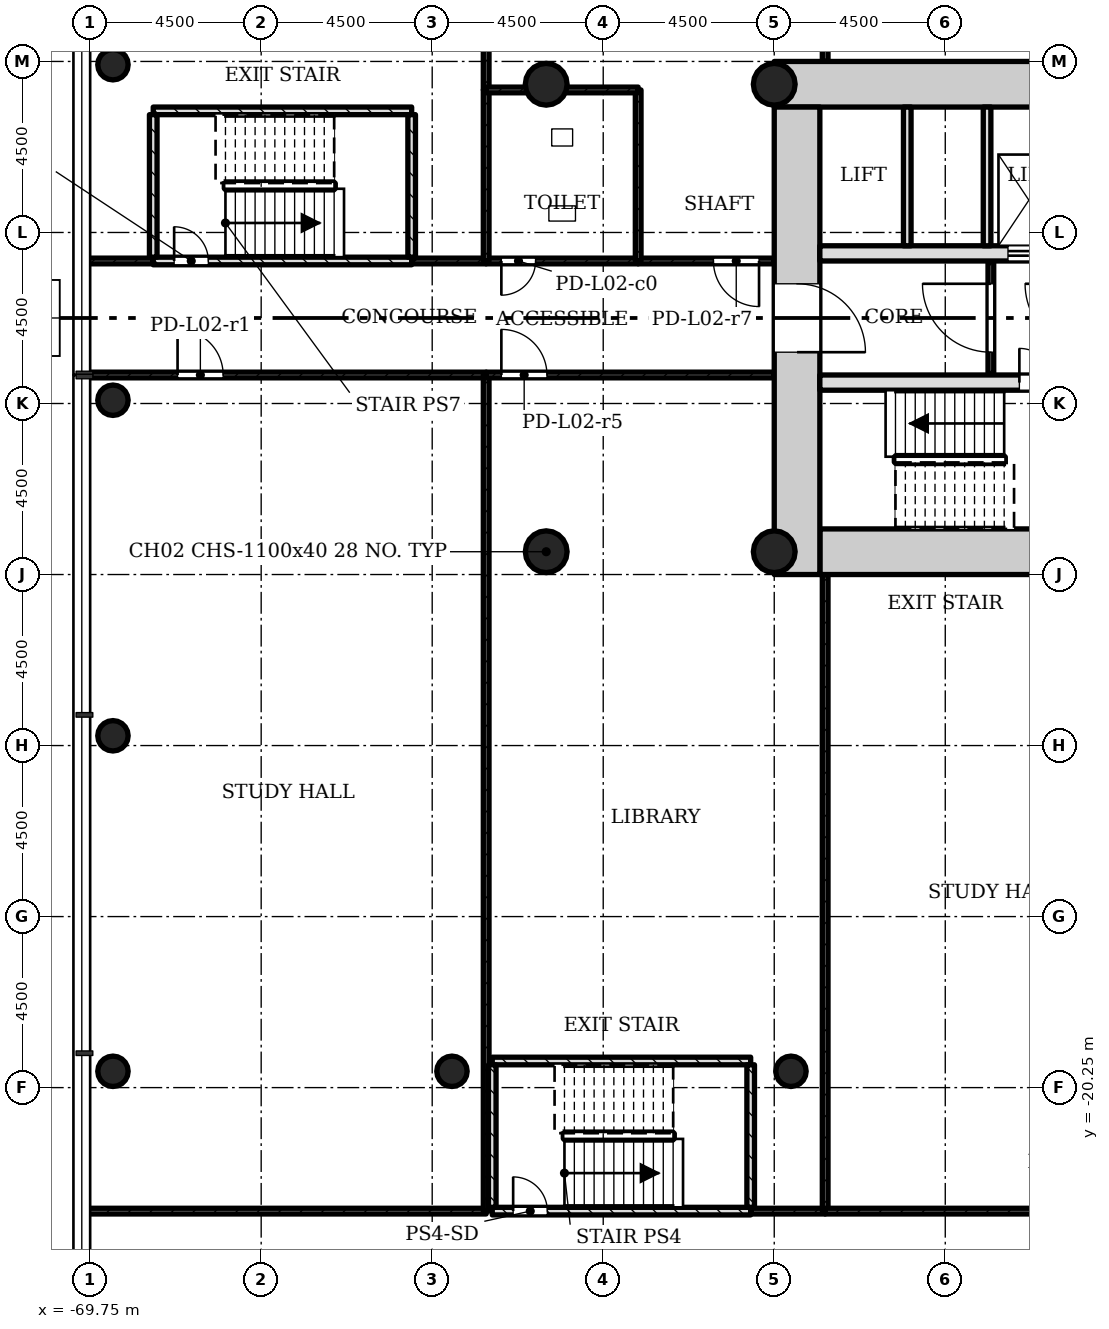
"""IFC4 building model, lengths in metres.
Left out: names, types, materials, properties, quantities, classifications, styles, units other than length and angle.
Written with IfcOpenShell. Run it as: python <this file> out.ifc"""

import sys

from ifc_helpers import new_model, si_unit, direction, frame, frame_2d, origin, origin_2d, place, context, subcontext, project, spatial, rectangle, hollow_circle, extrude, element, fill, save


model = new_model("IFC4")
c1 = context("Model", 3, precision=1e-05, world=origin(), true_north=direction((0.0, 1.0)))
c2 = subcontext(c1, "Body", "Model", "MODEL_VIEW")
j1 = project(units=[si_unit("LENGTHUNIT", "METRE"), si_unit("PLANEANGLEUNIT", "RADIAN")], contexts=[c1])
p1 = place(None, origin())
s1 = spatial("IfcSite", under=j1, at=p1, CompositionType="ELEMENT")
p2 = place(p1, origin())
s2 = spatial("IfcBuilding", under=s1, at=p2, CompositionType="ELEMENT")
p3 = place(p2, frame((0.0, 0.0, 11.0)))
s3 = spatial("IfcBuildingStorey", under=s2, at=p3, CompositionType="ELEMENT", Elevation=11.0)
for number, where, z_axis, x_axis in (
    (1, (-50.55, -6.15, 0.0), (0.0, 0.0, 1.0), (1.0, 0.0, 0.0)),
    (2, (-43.95, 6.15, 0.0), (0.0, 0.0, 1.0), (-1.0, 0.0, 0.0)),
):
    element("IfcWall", number, at=place(p3, frame(where, z_axis=z_axis, x_axis=x_axis)), inside=s3, PredefinedType="SHEAR", context=c2, shape_type="SweptSolid", body=[
        extrude(rectangle(XDim=7.8, YDim=1.2, at=frame_2d((3.9, 0.0))), origin(), (0.0, 0.0, 1.0), 4.5),
    ])
p4 = place(p3, frame((-51.15, 5.55, 0.0), z_axis=(0.0, 0.0, 1.0), x_axis=(0.0, -1.0, 0.0)))
e3 = element("IfcWall", 3, at=p4, inside=s3, PredefinedType="SHEAR", context=c2, shape_type="SweptSolid", body=[
    extrude(rectangle(XDim=12.3, YDim=1.2, at=frame_2d((6.15, 0.0))), origin(), (0.0, 0.0, 1.0), 4.5),
])
p5 = place(p4, frame((4.65, 0.0, 0.0)))
e4 = element("IfcOpeningElement", 4, at=p5, cuts=e3, PredefinedType="OPENING", context=c2, shape_type="SweptSolid", body=[
    extrude(rectangle(XDim=1.8, YDim=2.1, at=frame_2d((0.9, 1.05))), frame((0.0, 0.61, 0.0), z_axis=(0.0, -1.0, 0.0), x_axis=(1.0, 0.0, 0.0)), (0.0, 0.0, 1.0), 1.22),
])
p6 = place(p3, frame((-50.55, -1.7, 0.0), z_axis=(0.0, 0.0, 1.0), x_axis=(1.0, 0.0, 0.0)))
e5 = element("IfcWall", 5, at=p6, inside=s3, PredefinedType="SHEAR", context=c2, shape_type="SweptSolid", body=[
    extrude(rectangle(XDim=6.6, YDim=0.4, at=frame_2d((3.3, 0.0))), origin(), (0.0, 0.0, 1.0), 4.5),
])
p7 = place(p6, frame((5.25, 0.0, 0.0)))
e6 = element("IfcOpeningElement", 6, at=p7, cuts=e5, PredefinedType="OPENING", context=c2, shape_type="SweptSolid", body=[
    extrude(rectangle(XDim=0.9, YDim=2.1, at=frame_2d((0.45, 1.05))), frame((0.0, 0.21, 0.0), z_axis=(0.0, -1.0, 0.0), x_axis=(1.0, 0.0, 0.0)), (0.0, 0.0, 1.0), 0.42),
])
p8 = place(p3, frame((-50.55, 1.7, 0.0), z_axis=(0.0, 0.0, 1.0), x_axis=(1.0, 0.0, 0.0)))
e7 = element("IfcWall", 7, at=p8, inside=s3, PredefinedType="SHEAR", context=c2, shape_type="SweptSolid", body=[
    extrude(rectangle(XDim=6.6, YDim=0.4, at=frame_2d((3.3, 0.0))), origin(), (0.0, 0.0, 1.0), 4.5),
])
p9 = place(p8, frame((4.95, 0.0, 0.0)))
e8 = element("IfcOpeningElement", 8, at=p9, cuts=e7, PredefinedType="OPENING", context=c2, shape_type="SweptSolid", body=[
    extrude(rectangle(XDim=1.1, YDim=2.1, at=frame_2d((0.55, 1.05))), frame((0.0, 0.21, 0.0), z_axis=(0.0, -1.0, 0.0), x_axis=(1.0, 0.0, 0.0)), (0.0, 0.0, 1.0), 0.42),
])
for number, where, z_axis, x_axis in (
    (9, (-51.75, -6.15, 0.0), (0.0, 0.0, 1.0), (1.0, 0.0, 0.0)),
    (10, (-51.75, 6.15, 0.0), (0.0, 0.0, 1.0), (1.0, 0.0, 0.0)),
    (11, (-57.75, -6.15, 0.0), (0.0, 0.0, 1.0), (1.0, 0.0, 0.0)),
    (12, (-57.75, 6.15, 0.0), (0.0, 0.0, 1.0), (1.0, 0.0, 0.0)),
):
    element("IfcColumn", number, at=place(p3, frame(where, z_axis=z_axis, x_axis=x_axis)), inside=s3, PredefinedType="COLUMN", context=c2, shape_type="SweptSolid", body=[
        extrude(hollow_circle(Radius=0.55, WallThickness=0.04, at=origin_2d()), origin(), (0.0, 0.0, 1.0), 4.5),
    ])
for number, where, z_axis, x_axis in (
    (13, (-69.15, -19.821, 0.0), (0.0, 0.0, 1.0), (1.0, 0.0, 0.0)),
    (14, (-60.23, -19.821, 0.0), (0.0, 0.0, 1.0), (1.0, 0.0, 0.0)),
    (15, (-51.31, -19.821, 0.0), (0.0, 0.0, 1.0), (1.0, 0.0, 0.0)),
    (16, (-69.15, -10.993, 0.0), (0.0, 0.0, 1.0), (1.0, 0.0, 0.0)),
    (17, (-69.15, -2.164, 0.0), (0.0, 0.0, 1.0), (1.0, 0.0, 0.0)),
    (18, (-69.15, 6.664, 0.0), (0.0, 0.0, 1.0), (1.0, 0.0, 0.0)),
):
    element("IfcColumn", number, at=place(p3, frame(where, z_axis=z_axis, x_axis=x_axis)), inside=s3, PredefinedType="COLUMN", context=c2, shape_type="SweptSolid", body=[
        extrude(hollow_circle(Radius=0.4, WallThickness=0.028, at=origin_2d()), origin(), (0.0, 0.0, 1.0), 4.5),
    ])
p10 = place(p3, frame((-46.05, 1.5, 0.0), z_axis=(0.0, 0.0, 1.0), x_axis=(0.0, -1.0, 0.0)))
e19 = element("IfcWall", 19, at=p10, inside=s3, PredefinedType="PARTITIONING", context=c2, shape_type="SweptSolid", body=[
    extrude(rectangle(XDim=3.0, YDim=0.15, at=frame_2d((1.5, 0.0))), origin(), (0.0, 0.0, 1.0), 4.08),
])
p11 = place(p10, frame((0.6, 0.0, 0.0)))
e20 = element("IfcOpeningElement", 20, at=p11, cuts=e19, PredefinedType="OPENING", context=c2, shape_type="SweptSolid", body=[
    extrude(rectangle(XDim=1.8, YDim=2.1, at=frame_2d((0.9, 1.05))), frame((0.0, 0.085, 0.0), z_axis=(0.0, -1.0, 0.0), x_axis=(1.0, 0.0, 0.0)), (0.0, 0.0, 1.0), 0.17),
])
for number, where, z_axis, x_axis in (
    (21, (-46.15, 5.55, 0.0), (0.0, 0.0, 1.0), (0.0, -1.0, 0.0)),
    (22, (-48.25, 5.55, 0.0), (0.0, 0.0, 1.0), (0.0, -1.0, 0.0)),
):
    element("IfcWall", number, at=place(p3, frame(where, z_axis=z_axis, x_axis=x_axis)), inside=s3, PredefinedType="SOLIDWALL", context=c2, shape_type="SweptSolid", body=[
        extrude(rectangle(XDim=3.65, YDim=0.2, at=frame_2d((1.825, 0.0))), origin(), (0.0, 0.0, 1.0), 4.08),
    ])
p12 = place(p3, frame((-69.85, -1.5, 0.0), z_axis=(0.0, 0.0, 1.0), x_axis=(1.0, 0.0, 0.0)))
e23 = element("IfcWall", 23, at=p12, inside=s3, PredefinedType="PARTITIONING", context=c2, shape_type="SweptSolid", body=[
    extrude(rectangle(XDim=10.52, YDim=0.15, at=frame_2d((5.26, 0.0))), origin(), (0.0, 0.0, 1.0), 4.08),
])
p13 = place(p12, frame((2.4, 0.0, 0.0)))
e24 = element("IfcOpeningElement", 24, at=p13, cuts=e23, PredefinedType="OPENING", context=c2, shape_type="SweptSolid", body=[
    extrude(rectangle(XDim=1.2, YDim=2.1, at=frame_2d((0.6, 1.05))), frame((0.0, 0.085, 0.0), z_axis=(0.0, -1.0, 0.0), x_axis=(1.0, 0.0, 0.0)), (0.0, 0.0, 1.0), 0.17),
])
p14 = place(p3, frame((-59.33, -23.5, 0.0), z_axis=(0.0, 0.0, 1.0), x_axis=(-1.0, 0.0, 0.0)))
e25 = element("IfcWall", 25, at=p14, inside=s3, PredefinedType="PARTITIONING", context=c2, shape_type="SweptSolid", body=[
    extrude(rectangle(XDim=10.52, YDim=0.15, at=frame_2d((5.26, 0.0))), origin(), (0.0, 0.0, 1.0), 4.08),
])
p15 = place(p3, frame((-59.33, -1.5, 0.0), z_axis=(0.0, 0.0, 1.0), x_axis=(0.0, -1.0, 0.0)))
e26 = element("IfcWall", 26, at=p15, inside=s3, PredefinedType="PARTITIONING", context=c2, shape_type="SweptSolid", body=[
    extrude(rectangle(XDim=22.0, YDim=0.15, at=frame_2d((11.0, 0.0))), origin(), (0.0, 0.0, 1.0), 4.08),
])
p16 = place(p3, frame((-59.33, 1.5, 0.0), z_axis=(0.0, 0.0, 1.0), x_axis=(-1.0, 0.0, 0.0)))
e27 = element("IfcWall", 27, at=p16, inside=s3, PredefinedType="PARTITIONING", context=c2, shape_type="SweptSolid", body=[
    extrude(rectangle(XDim=1.96, YDim=0.15, at=frame_2d((0.98, 0.0))), origin(), (0.0, 0.0, 1.0), 4.08),
])
p17 = place(p3, frame((-68.09, 1.5, 0.0), z_axis=(0.0, 0.0, 1.0), x_axis=(-1.0, 0.0, 0.0)))
e28 = element("IfcWall", 28, at=p17, inside=s3, PredefinedType="PARTITIONING", context=c2, shape_type="SweptSolid", body=[
    extrude(rectangle(XDim=1.76, YDim=0.15, at=frame_2d((0.88, 0.0))), origin(), (0.0, 0.0, 1.0), 4.08),
])
p18 = place(p3, frame((-59.33, 26.5, 0.0), z_axis=(0.0, 0.0, 1.0), x_axis=(0.0, -1.0, 0.0)))
e29 = element("IfcWall", 29, at=p18, inside=s3, PredefinedType="PARTITIONING", context=c2, shape_type="SweptSolid", body=[
    extrude(rectangle(XDim=20.5, YDim=0.15, at=frame_2d((10.25, 0.0))), origin(), (0.0, 0.0, 1.0), 4.08),
])
p19 = place(p3, frame((-59.33, -1.5, 0.0), z_axis=(0.0, 0.0, 1.0), x_axis=(1.0, 0.0, 0.0)))
e30 = element("IfcWall", 30, at=p19, inside=s3, PredefinedType="PARTITIONING", context=c2, shape_type="SweptSolid", body=[
    extrude(rectangle(XDim=7.58, YDim=0.15, at=frame_2d((3.79, 0.0))), origin(), (0.0, 0.0, 1.0), 4.08),
])
p20 = place(p19, frame((0.4, 0.0, 0.0)))
e31 = element("IfcOpeningElement", 31, at=p20, cuts=e30, PredefinedType="OPENING", context=c2, shape_type="SweptSolid", body=[
    extrude(rectangle(XDim=1.2, YDim=2.1, at=frame_2d((0.6, 1.05))), frame((0.0, 0.085, 0.0), z_axis=(0.0, -1.0, 0.0), x_axis=(1.0, 0.0, 0.0)), (0.0, 0.0, 1.0), 0.17),
])
p21 = place(p3, frame((-50.41, -23.5, 0.0), z_axis=(0.0, 0.0, 1.0), x_axis=(-1.0, 0.0, 0.0)))
e32 = element("IfcWall", 32, at=p21, inside=s3, PredefinedType="PARTITIONING", context=c2, shape_type="SweptSolid", body=[
    extrude(rectangle(XDim=1.96, YDim=0.15, at=frame_2d((0.98, 0.0))), origin(), (0.0, 0.0, 1.0), 4.08),
])
p22 = place(p3, frame((-50.41, -6.75, 0.0), z_axis=(0.0, 0.0, 1.0), x_axis=(0.0, -1.0, 0.0)))
e33 = element("IfcWall", 33, at=p22, inside=s3, PredefinedType="PARTITIONING", context=c2, shape_type="SweptSolid", body=[
    extrude(rectangle(XDim=16.75, YDim=0.15, at=frame_2d((8.375, 0.0))), origin(), (0.0, 0.0, 1.0), 4.08),
])
p23 = place(p3, frame((-51.75, 1.5, 0.0), z_axis=(0.0, 0.0, 1.0), x_axis=(-1.0, 0.0, 0.0)))
e34 = element("IfcWall", 34, at=p23, inside=s3, PredefinedType="PARTITIONING", context=c2, shape_type="SweptSolid", body=[
    extrude(rectangle(XDim=3.58, YDim=0.15, at=frame_2d((1.79, 0.0))), origin(), (0.0, 0.0, 1.0), 4.08),
])
p24 = place(p23, frame((0.4, 0.0, 0.0)))
e35 = element("IfcOpeningElement", 35, at=p24, cuts=e34, PredefinedType="OPENING", context=c2, shape_type="SweptSolid", body=[
    extrude(rectangle(XDim=1.2, YDim=2.1, at=frame_2d((0.6, 1.05))), frame((0.0, 0.085, 0.0), z_axis=(0.0, -1.0, 0.0), x_axis=(1.0, 0.0, 0.0)), (0.0, 0.0, 1.0), 0.17),
])
p25 = place(p3, frame((-41.49, -23.5, 0.0), z_axis=(0.0, 0.0, 1.0), x_axis=(-1.0, 0.0, 0.0)))
e36 = element("IfcWall", 36, at=p25, inside=s3, PredefinedType="PARTITIONING", context=c2, shape_type="SweptSolid", body=[
    extrude(rectangle(XDim=8.92, YDim=0.15, at=frame_2d((4.46, 0.0))), origin(), (0.0, 0.0, 1.0), 4.08),
])
p26 = place(p25, frame((0.4, 0.0, 0.0)))
e37 = element("IfcOpeningElement", 37, at=p26, cuts=e36, PredefinedType="OPENING", context=c2, shape_type="SweptSolid", body=[
    extrude(rectangle(XDim=1.2, YDim=2.1, at=frame_2d((0.6, 1.05))), frame((0.0, 0.085, 0.0), z_axis=(0.0, -1.0, 0.0), x_axis=(1.0, 0.0, 0.0)), (0.0, 0.0, 1.0), 0.17),
])
p27 = place(p3, frame((-50.41, 6.75, 0.0), z_axis=(0.0, 0.0, 1.0), x_axis=(0.0, 1.0, 0.0)))
e38 = element("IfcWall", 38, at=p27, inside=s3, PredefinedType="PARTITIONING", context=c2, shape_type="SweptSolid", body=[
    extrude(rectangle(XDim=19.75, YDim=0.15, at=frame_2d((9.875, 0.0))), origin(), (0.0, 0.0, 1.0), 4.08),
])
p28 = place(p3, frame((-59.33, 1.5, 0.0), z_axis=(0.0, 0.0, 1.0), x_axis=(1.0, 0.0, 0.0)))
e39 = element("IfcWall", 39, at=p28, inside=s3, PredefinedType="PARTITIONING", context=c2, shape_type="SweptSolid", body=[
    extrude(rectangle(XDim=4.0, YDim=0.15, at=frame_2d((2.0, 0.0))), origin(), (0.0, 0.0, 1.0), 4.08),
])
p29 = place(p28, frame((0.4, 0.0, 0.0)))
e40 = element("IfcOpeningElement", 40, at=p29, cuts=e39, PredefinedType="OPENING", context=c2, shape_type="SweptSolid", body=[
    extrude(rectangle(XDim=0.9, YDim=2.1, at=frame_2d((0.45, 1.05))), frame((0.0, 0.085, 0.0), z_axis=(0.0, -1.0, 0.0), x_axis=(1.0, 0.0, 0.0)), (0.0, 0.0, 1.0), 0.17),
])
for number, where, z_axis, x_axis in (
    (41, (-59.33, 6.0, 0.0), (0.0, 0.0, 1.0), (0.0, -1.0, 0.0)),
    (42, (-55.33, 1.5, 0.0), (0.0, 0.0, 1.0), (0.0, 1.0, 0.0)),
):
    element("IfcWall", number, at=place(p3, frame(where, z_axis=z_axis, x_axis=x_axis)), inside=s3, PredefinedType="PARTITIONING", context=c2, shape_type="SweptSolid", body=[
        extrude(rectangle(XDim=4.5, YDim=0.15, at=frame_2d((2.25, 0.0))), origin(), (0.0, 0.0, 1.0), 4.08),
    ])
p30 = place(p3, frame((-55.33, 6.0, 0.0), z_axis=(0.0, 0.0, 1.0), x_axis=(-1.0, 0.0, 0.0)))
e43 = element("IfcWall", 43, at=p30, inside=s3, PredefinedType="PARTITIONING", context=c2, shape_type="SweptSolid", body=[
    extrude(rectangle(XDim=4.0, YDim=0.15, at=frame_2d((2.0, 0.0))), origin(), (0.0, 0.0, 1.0), 4.08),
])
p31 = place(p3, frame((-59.17, -23.5, 0.0), z_axis=(0.0, 0.0, 1.0), x_axis=(1.0, 0.0, 0.0)))
e44 = element("IfcWall", 44, at=p31, inside=s3, PredefinedType="SHEAR", context=c2, shape_type="SweptSolid", body=[
    extrude(rectangle(XDim=6.8, YDim=0.2, at=frame_2d((3.4, 0.0))), origin(), (0.0, 0.0, 1.0), 4.08),
])
p32 = place(p31, frame((0.55, 0.0, 0.0)))
e45 = element("IfcOpeningElement", 45, at=p32, cuts=e44, PredefinedType="OPENING", context=c2, shape_type="SweptSolid", body=[
    extrude(rectangle(XDim=0.9, YDim=2.1, at=frame_2d((0.45, 1.05))), frame((0.0, 0.11, 0.0), z_axis=(0.0, -1.0, 0.0), x_axis=(1.0, 0.0, 0.0)), (0.0, 0.0, 1.0), 0.22),
])
p33 = place(p3, frame((-59.17, -19.55, 0.0), z_axis=(0.0, 0.0, 1.0), x_axis=(1.0, 0.0, 0.0)))
e46 = element("IfcWall", 46, at=p33, inside=s3, PredefinedType="SHEAR", context=c2, shape_type="SweptSolid", body=[
    extrude(rectangle(XDim=6.8, YDim=0.2, at=frame_2d((3.4, 0.0))), origin(), (0.0, 0.0, 1.0), 4.08),
])
for number, where, z_axis, x_axis in (
    (47, (-59.17, -23.4, 0.0), (0.0, 0.0, 1.0), (0.0, 1.0, 0.0)),
    (48, (-52.37, -23.4, 0.0), (0.0, 0.0, 1.0), (0.0, 1.0, 0.0)),
):
    element("IfcWall", number, at=place(p3, frame(where, z_axis=z_axis, x_axis=x_axis)), inside=s3, PredefinedType="SHEAR", context=c2, shape_type="SweptSolid", body=[
        extrude(rectangle(XDim=3.75, YDim=0.2, at=frame_2d((1.875, 0.0))), origin(), (0.0, 0.0, 1.0), 4.08),
    ])
p34 = place(p3, frame((-68.09, 1.5, 0.0), z_axis=(0.0, 0.0, 1.0), x_axis=(1.0, 0.0, 0.0)))
e49 = element("IfcWall", 49, at=p34, inside=s3, PredefinedType="SHEAR", context=c2, shape_type="SweptSolid", body=[
    extrude(rectangle(XDim=6.8, YDim=0.2, at=frame_2d((3.4, 0.0))), origin(), (0.0, 0.0, 1.0), 4.08),
])
p35 = place(p34, frame((0.55, 0.0, 0.0)))
e50 = element("IfcOpeningElement", 50, at=p35, cuts=e49, PredefinedType="OPENING", context=c2, shape_type="SweptSolid", body=[
    extrude(rectangle(XDim=0.9, YDim=2.1, at=frame_2d((0.45, 1.05))), frame((0.0, 0.11, 0.0), z_axis=(0.0, -1.0, 0.0), x_axis=(1.0, 0.0, 0.0)), (0.0, 0.0, 1.0), 0.22),
])
p36 = place(p3, frame((-68.09, 5.45, 0.0), z_axis=(0.0, 0.0, 1.0), x_axis=(1.0, 0.0, 0.0)))
e51 = element("IfcWall", 51, at=p36, inside=s3, PredefinedType="SHEAR", context=c2, shape_type="SweptSolid", body=[
    extrude(rectangle(XDim=6.8, YDim=0.2, at=frame_2d((3.4, 0.0))), origin(), (0.0, 0.0, 1.0), 4.08),
])
for number, where, z_axis, x_axis in (
    (52, (-68.09, 1.6, 0.0), (0.0, 0.0, 1.0), (0.0, 1.0, 0.0)),
    (53, (-61.29, 1.6, 0.0), (0.0, 0.0, 1.0), (0.0, 1.0, 0.0)),
):
    element("IfcWall", number, at=place(p3, frame(where, z_axis=z_axis, x_axis=x_axis)), inside=s3, PredefinedType="SHEAR", context=c2, shape_type="SweptSolid", body=[
        extrude(rectangle(XDim=3.75, YDim=0.2, at=frame_2d((1.875, 0.0))), origin(), (0.0, 0.0, 1.0), 4.08),
    ])
p37 = place(p11, origin())
e54 = element("IfcDoor", 54, at=p37, inside=s3, OperationType="SINGLE_SWING_LEFT", PredefinedType="DOOR", context=c2, shape_type="SweptSolid", body=[
    extrude(rectangle(XDim=1.8, YDim=2.1, at=frame_2d((0.9, 1.05))), frame((0.0, 0.025, 0.0), z_axis=(0.0, -1.0, 0.0), x_axis=(1.0, 0.0, 0.0)), (0.0, 0.0, 1.0), 0.05),
])
fill(e20, e54)
p38 = place(p13, origin())
e55 = element("IfcDoor", 55, at=p38, inside=s3, OperationType="SINGLE_SWING_RIGHT", PredefinedType="DOOR", context=c2, shape_type="SweptSolid", body=[
    extrude(rectangle(XDim=1.2, YDim=2.1, at=frame_2d((0.6, 1.05))), frame((0.0, 0.025, 0.0), z_axis=(0.0, -1.0, 0.0), x_axis=(1.0, 0.0, 0.0)), (0.0, 0.0, 1.0), 0.05),
])
fill(e24, e55)
p39 = place(p20, origin())
e56 = element("IfcDoor", 56, at=p39, inside=s3, OperationType="SINGLE_SWING_RIGHT", PredefinedType="DOOR", context=c2, shape_type="SweptSolid", body=[
    extrude(rectangle(XDim=1.2, YDim=2.1, at=frame_2d((0.6, 1.05))), frame((0.0, 0.025, 0.0), z_axis=(0.0, -1.0, 0.0), x_axis=(1.0, 0.0, 0.0)), (0.0, 0.0, 1.0), 0.05),
])
fill(e31, e56)
p40 = place(p24, origin())
e57 = element("IfcDoor", 57, at=p40, inside=s3, OperationType="SINGLE_SWING_RIGHT", PredefinedType="DOOR", context=c2, shape_type="SweptSolid", body=[
    extrude(rectangle(XDim=1.2, YDim=2.1, at=frame_2d((0.6, 1.05))), frame((0.0, 0.025, 0.0), z_axis=(0.0, -1.0, 0.0), x_axis=(1.0, 0.0, 0.0)), (0.0, 0.0, 1.0), 0.05),
])
fill(e35, e57)
p41 = place(p29, origin())
e58 = element("IfcDoor", 58, at=p41, inside=s3, OperationType="SINGLE_SWING_LEFT", PredefinedType="DOOR", context=c2, shape_type="SweptSolid", body=[
    extrude(rectangle(XDim=0.9, YDim=2.1, at=frame_2d((0.45, 1.05))), frame((0.0, 0.025, 0.0), z_axis=(0.0, -1.0, 0.0), x_axis=(1.0, 0.0, 0.0)), (0.0, 0.0, 1.0), 0.05),
])
fill(e40, e58)
p42 = place(p32, origin())
e59 = element("IfcDoor", 59, at=p42, inside=s3, OperationType="SINGLE_SWING_RIGHT", PredefinedType="DOOR", context=c2, shape_type="SweptSolid", body=[
    extrude(rectangle(XDim=0.9, YDim=2.1, at=frame_2d((0.45, 1.05))), frame((0.0, 0.025, 0.0), z_axis=(0.0, -1.0, 0.0), x_axis=(1.0, 0.0, 0.0)), (0.0, 0.0, 1.0), 0.05),
])
fill(e45, e59)
p43 = place(p35, origin())
e60 = element("IfcDoor", 60, at=p43, inside=s3, OperationType="SINGLE_SWING_RIGHT", PredefinedType="DOOR", context=c2, shape_type="SweptSolid", body=[
    extrude(rectangle(XDim=0.9, YDim=2.1, at=frame_2d((0.45, 1.05))), frame((0.0, 0.025, 0.0), z_axis=(0.0, -1.0, 0.0), x_axis=(1.0, 0.0, 0.0)), (0.0, 0.0, 1.0), 0.05),
])
fill(e50, e60)
p44 = place(p7, origin())
e61 = element("IfcDoor", 61, at=p44, inside=s3, OperationType="SINGLE_SWING_RIGHT", PredefinedType="DOOR", context=c2, shape_type="SweptSolid", body=[
    extrude(rectangle(XDim=0.9, YDim=2.1, at=frame_2d((0.45, 1.05))), frame((0.0, 0.025, 0.0), z_axis=(0.0, -1.0, 0.0), x_axis=(1.0, 0.0, 0.0)), (0.0, 0.0, 1.0), 0.05),
])
fill(e6, e61)
p45 = place(p9, origin())
e62 = element("IfcDoor", 62, at=p45, inside=s3, OperationType="SLIDING_TO_LEFT", PredefinedType="DOOR", context=c2, shape_type="SweptSolid", body=[
    extrude(rectangle(XDim=1.1, YDim=2.1, at=frame_2d((0.55, 1.05))), frame((0.0, 0.025, 0.0), z_axis=(0.0, -1.0, 0.0), x_axis=(1.0, 0.0, 0.0)), (0.0, 0.0, 1.0), 0.05),
])
fill(e8, e62)
p46 = place(p5, origin())
e63 = element("IfcDoor", 63, at=p46, inside=s3, OperationType="SINGLE_SWING_LEFT", PredefinedType="DOOR", context=c2, shape_type="SweptSolid", body=[
    extrude(rectangle(XDim=1.8, YDim=2.1, at=frame_2d((0.9, 1.05))), frame((0.0, 0.025, 0.0), z_axis=(0.0, -1.0, 0.0), x_axis=(1.0, 0.0, 0.0)), (0.0, 0.0, 1.0), 0.05),
])
fill(e4, e63)
save(model, sys.argv[1])
